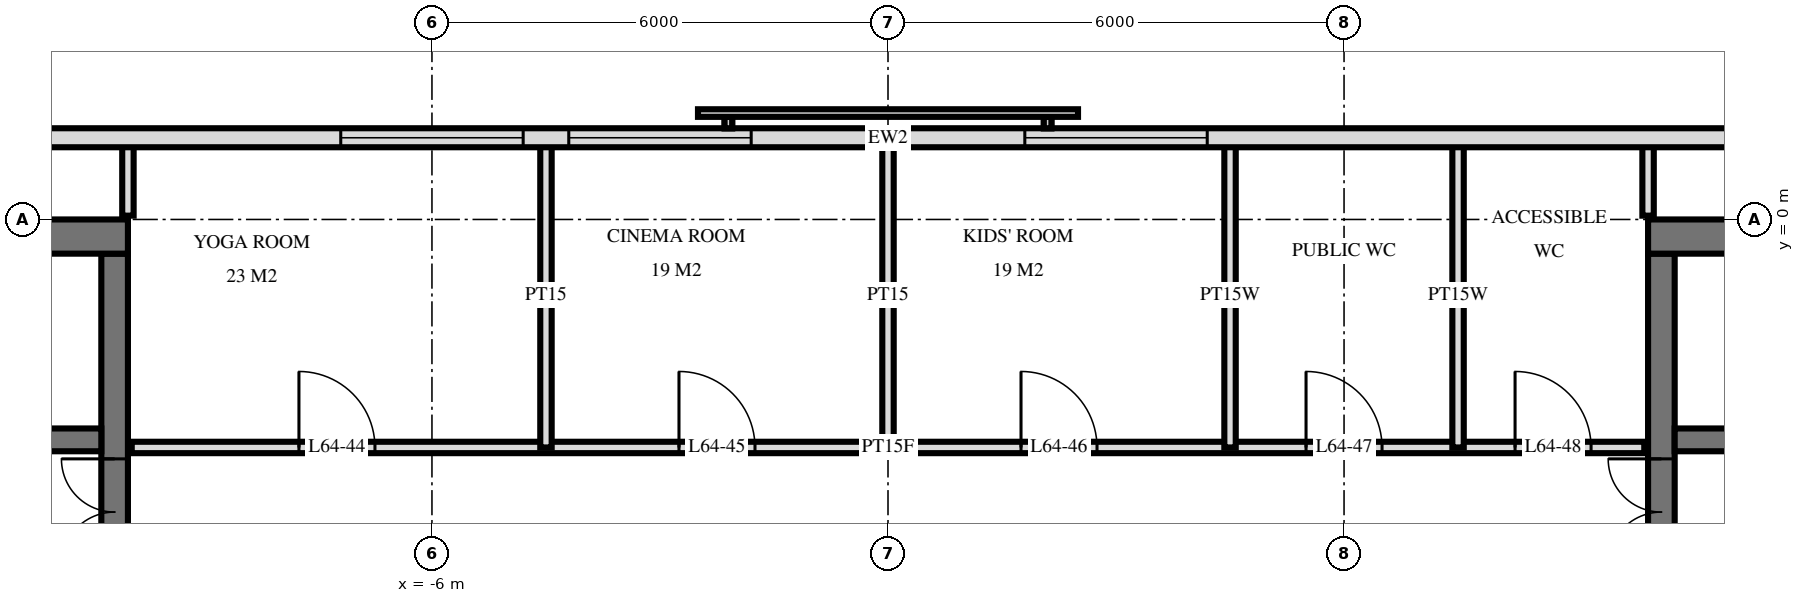
"""IFC4 building model, lengths in metres.
Left out: names, types, materials, properties, quantities, classifications, styles, units other than length and angle.
Written with IfcOpenShell. Run it as: python <this file> out.ifc"""

import sys

from ifc_helpers import new_model, si_unit, direction, frame, frame_2d, origin, place, context, subcontext, project, spatial, rectangle, extrude, element, fill, save


model = new_model("IFC4")
c1 = context("Model", 3, precision=1e-05, world=origin(), true_north=direction((0.0, 1.0)))
c2 = subcontext(c1, "Body", "Model", "MODEL_VIEW")
j1 = project(units=[si_unit("LENGTHUNIT", "METRE"), si_unit("PLANEANGLEUNIT", "RADIAN")], contexts=[c1])
p1 = place(None, origin())
s1 = spatial("IfcSite", under=j1, at=p1, CompositionType="ELEMENT")
p2 = place(p1, origin())
s2 = spatial("IfcBuilding", under=s1, at=p2, CompositionType="ELEMENT")
p3 = place(p2, frame((0.0, 0.0, 243.1)))
s3 = spatial("IfcBuildingStorey", under=s2, at=p3, CompositionType="ELEMENT", Elevation=243.1)
p4 = place(p3, frame((-24.5, -0.225, 0.0), z_axis=(0.0, 0.0, 1.0), x_axis=(1.0, 0.0, 0.0)))
e1 = element("IfcWall", 1, at=p4, inside=s3, PredefinedType="SHEAR", context=c2, shape_type="SweptSolid", body=[
    extrude(rectangle(XDim=14.5, YDim=0.45, at=frame_2d((7.25, 0.0))), origin(), (0.0, 0.0, 1.0), 3.5),
])
p5 = place(p3, frame((-10.175, -14.55, 0.0), z_axis=(0.0, 0.0, 1.0), x_axis=(0.0, 1.0, 0.0)))
e2 = element("IfcWall", 2, at=p5, inside=s3, PredefinedType="SHEAR", context=c2, shape_type="SweptSolid", body=[
    extrude(rectangle(XDim=14.1, YDim=0.35, at=frame_2d((7.05, 0.0))), origin(), (0.0, 0.0, 1.0), 3.5),
])
p6 = place(p5, frame((8.4, 0.0, 0.0)))
e3 = element("IfcOpeningElement", 3, at=p6, cuts=e2, PredefinedType="OPENING", context=c2, shape_type="SweptSolid", body=[
    extrude(rectangle(XDim=1.4, YDim=2.4, at=frame_2d((0.7, 1.2))), frame((0.0, 0.185, 0.0), z_axis=(0.0, -1.0, 0.0), x_axis=(1.0, 0.0, 0.0)), (0.0, 0.0, 1.0), 0.37),
])
p7 = place(p5, frame((10.0, 0.0, 0.0)))
e4 = element("IfcOpeningElement", 4, at=p7, cuts=e2, PredefinedType="OPENING", context=c2, shape_type="SweptSolid", body=[
    extrude(rectangle(XDim=1.4, YDim=2.4, at=frame_2d((0.7, 1.2))), frame((0.0, 0.185, 0.0), z_axis=(0.0, -1.0, 0.0), x_axis=(1.0, 0.0, 0.0)), (0.0, 0.0, 1.0), 0.37),
])
p8 = place(p5, frame((4.0, 0.0, 0.0)))
e5 = element("IfcOpeningElement", 5, at=p8, cuts=e2, PredefinedType="OPENING", context=c2, shape_type="SweptSolid", body=[
    extrude(rectangle(XDim=1.2, YDim=2.1, at=frame_2d((0.6, 1.05))), frame((0.0, 0.185, 0.0), z_axis=(0.0, -1.0, 0.0), x_axis=(1.0, 0.0, 0.0)), (0.0, 0.0, 1.0), 0.37),
])
p9 = place(p3, frame((-24.05, -2.9, 0.0), z_axis=(0.0, 0.0, 1.0), x_axis=(1.0, 0.0, 0.0)))
e6 = element("IfcWall", 6, at=p9, inside=s3, PredefinedType="SHEAR", context=c2, shape_type="SweptSolid", body=[
    extrude(rectangle(XDim=13.7, YDim=0.3, at=frame_2d((6.85, 0.0))), origin(), (0.0, 0.0, 1.0), 3.5),
])
p10 = place(p9, frame((0.55, 0.0, 0.0)))
e7 = element("IfcOpeningElement", 7, at=p10, cuts=e6, PredefinedType="OPENING", context=c2, shape_type="SweptSolid", body=[
    extrude(rectangle(XDim=1.1, YDim=2.1, at=frame_2d((0.55, 1.05))), frame((0.0, 0.16, 0.0), z_axis=(0.0, -1.0, 0.0), x_axis=(1.0, 0.0, 0.0)), (0.0, 0.0, 1.0), 0.32),
])
p11 = place(p9, frame((6.613, 0.0, 0.0)))
e8 = element("IfcOpeningElement", 8, at=p11, cuts=e6, PredefinedType="OPENING", context=c2, shape_type="SweptSolid", body=[
    extrude(rectangle(XDim=0.9, YDim=2.1, at=frame_2d((0.45, 1.05))), frame((0.0, 0.16, 0.0), z_axis=(0.0, -1.0, 0.0), x_axis=(1.0, 0.0, 0.0)), (0.0, 0.0, 1.0), 0.32),
])
p12 = place(p9, frame((5.188, 0.0, 0.0)))
e9 = element("IfcOpeningElement", 9, at=p12, cuts=e6, PredefinedType="OPENING", context=c2, shape_type="SweptSolid", body=[
    extrude(rectangle(XDim=0.9, YDim=2.1, at=frame_2d((0.45, 1.05))), frame((0.0, 0.16, 0.0), z_axis=(0.0, -1.0, 0.0), x_axis=(1.0, 0.0, 0.0)), (0.0, 0.0, 1.0), 0.32),
])
p13 = place(p9, frame((3.0, 0.0, 0.0)))
e10 = element("IfcOpeningElement", 10, at=p13, cuts=e6, PredefinedType="OPENING", context=c2, shape_type="SweptSolid", body=[
    extrude(rectangle(XDim=1.0, YDim=2.1, at=frame_2d((0.5, 1.05))), frame((0.0, 0.16, 0.0), z_axis=(0.0, -1.0, 0.0), x_axis=(1.0, 0.0, 0.0)), (0.0, 0.0, 1.0), 0.32),
])
p14 = place(p3, frame((10.0, -0.225, 0.0), z_axis=(0.0, 0.0, 1.0), x_axis=(1.0, 0.0, 0.0)))
e11 = element("IfcWall", 11, at=p14, inside=s3, PredefinedType="SHEAR", context=c2, shape_type="SweptSolid", body=[
    extrude(rectangle(XDim=14.5, YDim=0.45, at=frame_2d((7.25, 0.0))), origin(), (0.0, 0.0, 1.0), 3.5),
])
p15 = place(p3, frame((10.175, -14.55, 0.0), z_axis=(0.0, 0.0, 1.0), x_axis=(0.0, 1.0, 0.0)))
e12 = element("IfcWall", 12, at=p15, inside=s3, PredefinedType="SHEAR", context=c2, shape_type="SweptSolid", body=[
    extrude(rectangle(XDim=14.1, YDim=0.35, at=frame_2d((7.05, 0.0))), origin(), (0.0, 0.0, 1.0), 3.5),
])
p16 = place(p15, frame((8.4, 0.0, 0.0)))
e13 = element("IfcOpeningElement", 13, at=p16, cuts=e12, PredefinedType="OPENING", context=c2, shape_type="SweptSolid", body=[
    extrude(rectangle(XDim=1.4, YDim=2.4, at=frame_2d((0.7, 1.2))), frame((0.0, 0.185, 0.0), z_axis=(0.0, -1.0, 0.0), x_axis=(1.0, 0.0, 0.0)), (0.0, 0.0, 1.0), 0.37),
])
p17 = place(p15, frame((10.0, 0.0, 0.0)))
e14 = element("IfcOpeningElement", 14, at=p17, cuts=e12, PredefinedType="OPENING", context=c2, shape_type="SweptSolid", body=[
    extrude(rectangle(XDim=1.4, YDim=2.4, at=frame_2d((0.7, 1.2))), frame((0.0, 0.185, 0.0), z_axis=(0.0, -1.0, 0.0), x_axis=(1.0, 0.0, 0.0)), (0.0, 0.0, 1.0), 0.37),
])
p18 = place(p15, frame((4.0, 0.0, 0.0)))
e15 = element("IfcOpeningElement", 15, at=p18, cuts=e12, PredefinedType="OPENING", context=c2, shape_type="SweptSolid", body=[
    extrude(rectangle(XDim=1.2, YDim=2.1, at=frame_2d((0.6, 1.05))), frame((0.0, 0.185, 0.0), z_axis=(0.0, -1.0, 0.0), x_axis=(1.0, 0.0, 0.0)), (0.0, 0.0, 1.0), 0.37),
])
p19 = place(p3, frame((10.35, -2.9, 0.0), z_axis=(0.0, 0.0, 1.0), x_axis=(1.0, 0.0, 0.0)))
e16 = element("IfcWall", 16, at=p19, inside=s3, PredefinedType="SHEAR", context=c2, shape_type="SweptSolid", body=[
    extrude(rectangle(XDim=13.7, YDim=0.3, at=frame_2d((6.85, 0.0))), origin(), (0.0, 0.0, 1.0), 3.5),
])
p20 = place(p19, frame((12.05, 0.0, 0.0)))
e17 = element("IfcOpeningElement", 17, at=p20, cuts=e16, PredefinedType="OPENING", context=c2, shape_type="SweptSolid", body=[
    extrude(rectangle(XDim=1.1, YDim=2.1, at=frame_2d((0.55, 1.05))), frame((0.0, 0.16, 0.0), z_axis=(0.0, -1.0, 0.0), x_axis=(1.0, 0.0, 0.0)), (0.0, 0.0, 1.0), 0.32),
])
p21 = place(p19, frame((6.188, 0.0, 0.0)))
e18 = element("IfcOpeningElement", 18, at=p21, cuts=e16, PredefinedType="OPENING", context=c2, shape_type="SweptSolid", body=[
    extrude(rectangle(XDim=0.9, YDim=2.1, at=frame_2d((0.45, 1.05))), frame((0.0, 0.16, 0.0), z_axis=(0.0, -1.0, 0.0), x_axis=(1.0, 0.0, 0.0)), (0.0, 0.0, 1.0), 0.32),
])
p22 = place(p19, frame((7.613, 0.0, 0.0)))
e19 = element("IfcOpeningElement", 19, at=p22, cuts=e16, PredefinedType="OPENING", context=c2, shape_type="SweptSolid", body=[
    extrude(rectangle(XDim=0.9, YDim=2.1, at=frame_2d((0.45, 1.05))), frame((0.0, 0.16, 0.0), z_axis=(0.0, -1.0, 0.0), x_axis=(1.0, 0.0, 0.0)), (0.0, 0.0, 1.0), 0.32),
])
p23 = place(p19, frame((9.7, 0.0, 0.0)))
e20 = element("IfcOpeningElement", 20, at=p23, cuts=e16, PredefinedType="OPENING", context=c2, shape_type="SweptSolid", body=[
    extrude(rectangle(XDim=1.0, YDim=2.1, at=frame_2d((0.5, 1.05))), frame((0.0, 0.16, 0.0), z_axis=(0.0, -1.0, 0.0), x_axis=(1.0, 0.0, 0.0)), (0.0, 0.0, 1.0), 0.32),
])
p24 = place(p3, frame((22.475, 1.075, 0.0), z_axis=(0.0, 0.0, 1.0), x_axis=(-1.0, 0.0, 0.0)))
e21 = element("IfcWall", 21, at=p24, inside=s3, PredefinedType="SOLIDWALL", context=c2, shape_type="SweptSolid", body=[
    extrude(rectangle(XDim=44.951, YDim=0.25, at=frame_2d((22.475, 0.0))), origin(), (0.0, 0.0, 1.0), 3.2),
])
p25 = place(p24, frame((18.275, 0.0, 0.9)))
e22 = element("IfcOpeningElement", 22, at=p25, cuts=e21, PredefinedType="OPENING", context=c2, shape_type="SweptSolid", body=[
    extrude(rectangle(XDim=2.4, YDim=1.5, at=frame_2d((1.2, 0.75))), frame((0.0, 0.135, 0.0), z_axis=(0.0, -1.0, 0.0), x_axis=(1.0, 0.0, 0.0)), (0.0, 0.0, 1.0), 0.27),
])
p26 = place(p24, frame((24.275, 0.0, 0.9)))
e23 = element("IfcOpeningElement", 23, at=p26, cuts=e21, PredefinedType="OPENING", context=c2, shape_type="SweptSolid", body=[
    extrude(rectangle(XDim=2.4, YDim=1.5, at=frame_2d((1.2, 0.75))), frame((0.0, 0.135, 0.0), z_axis=(0.0, -1.0, 0.0), x_axis=(1.0, 0.0, 0.0)), (0.0, 0.0, 1.0), 0.27),
])
p27 = place(p24, frame((27.275, 0.0, 0.9)))
e24 = element("IfcOpeningElement", 24, at=p27, cuts=e21, PredefinedType="OPENING", context=c2, shape_type="SweptSolid", body=[
    extrude(rectangle(XDim=2.4, YDim=1.5, at=frame_2d((1.2, 0.75))), frame((0.0, 0.135, 0.0), z_axis=(0.0, -1.0, 0.0), x_axis=(1.0, 0.0, 0.0)), (0.0, 0.0, 1.0), 0.27),
])
p28 = place(p3, frame((10.0, 0.05, 0.0), z_axis=(0.0, 0.0, 1.0), x_axis=(0.0, 1.0, 0.0)))
e25 = element("IfcWall", 25, at=p28, inside=s3, PredefinedType="PLUMBINGWALL", context=c2, shape_type="SweptSolid", body=[
    extrude(rectangle(XDim=0.97, YDim=0.15, at=frame_2d((0.485, 0.0))), origin(), (0.0, 0.0, 1.0), 3.22),
])
for number, where, z_axis, x_axis in (
    (26, (7.5, -3.0, 0.0), (0.0, 0.0, 1.0), (0.0, 1.0, 0.0)),
    (27, (4.5, -3.0, 0.0), (0.0, 0.0, 1.0), (0.0, 1.0, 0.0)),
):
    element("IfcWall", number, at=place(p3, frame(where, z_axis=z_axis, x_axis=x_axis)), inside=s3, PredefinedType="PLUMBINGWALL", context=c2, shape_type="SweptSolid", body=[
        extrude(rectangle(XDim=4.02, YDim=0.15, at=frame_2d((2.01, 0.0))), origin(), (0.0, 0.0, 1.0), 3.22),
    ])
for number, where, z_axis, x_axis in (
    (28, (0.0, -3.0, 0.0), (0.0, 0.0, 1.0), (0.0, 1.0, 0.0)),
    (29, (-4.5, -3.0, 0.0), (0.0, 0.0, 1.0), (0.0, 1.0, 0.0)),
):
    element("IfcWall", number, at=place(p3, frame(where, z_axis=z_axis, x_axis=x_axis)), inside=s3, PredefinedType="PARTITIONING", context=c2, shape_type="SweptSolid", body=[
        extrude(rectangle(XDim=4.02, YDim=0.15, at=frame_2d((2.01, 0.0))), origin(), (0.0, 0.0, 1.0), 3.22),
    ])
p29 = place(p3, frame((-10.0, 0.05, 0.0), z_axis=(0.0, 0.0, 1.0), x_axis=(0.0, 1.0, 0.0)))
e30 = element("IfcWall", 30, at=p29, inside=s3, PredefinedType="PARTITIONING", context=c2, shape_type="SweptSolid", body=[
    extrude(rectangle(XDim=0.97, YDim=0.15, at=frame_2d((0.485, 0.0))), origin(), (0.0, 0.0, 1.0), 3.22),
])
p30 = place(p3, frame((-9.95, -3.0, 0.0), z_axis=(0.0, 0.0, 1.0), x_axis=(1.0, 0.0, 0.0)))
e31 = element("IfcWall", 31, at=p30, inside=s3, PredefinedType="PARTITIONING", context=c2, shape_type="SweptSolid", body=[
    extrude(rectangle(XDim=19.9, YDim=0.15, at=frame_2d((9.95, 0.0))), origin(), (0.0, 0.0, 1.0), 3.22),
])
p31 = place(p30, frame((2.2, 0.0, 0.0)))
e32 = element("IfcOpeningElement", 32, at=p31, cuts=e31, PredefinedType="OPENING", context=c2, shape_type="SweptSolid", body=[
    extrude(rectangle(XDim=1.0, YDim=2.1, at=frame_2d((0.5, 1.05))), frame((0.0, 0.085, 0.0), z_axis=(0.0, -1.0, 0.0), x_axis=(1.0, 0.0, 0.0)), (0.0, 0.0, 1.0), 0.17),
])
p32 = place(p30, frame((7.2, 0.0, 0.0)))
e33 = element("IfcOpeningElement", 33, at=p32, cuts=e31, PredefinedType="OPENING", context=c2, shape_type="SweptSolid", body=[
    extrude(rectangle(XDim=1.0, YDim=2.1, at=frame_2d((0.5, 1.05))), frame((0.0, 0.085, 0.0), z_axis=(0.0, -1.0, 0.0), x_axis=(1.0, 0.0, 0.0)), (0.0, 0.0, 1.0), 0.17),
])
p33 = place(p30, frame((11.7, 0.0, 0.0)))
e34 = element("IfcOpeningElement", 34, at=p33, cuts=e31, PredefinedType="OPENING", context=c2, shape_type="SweptSolid", body=[
    extrude(rectangle(XDim=1.0, YDim=2.1, at=frame_2d((0.5, 1.05))), frame((0.0, 0.085, 0.0), z_axis=(0.0, -1.0, 0.0), x_axis=(1.0, 0.0, 0.0)), (0.0, 0.0, 1.0), 0.17),
])
p34 = place(p30, frame((15.45, 0.0, 0.0)))
e35 = element("IfcOpeningElement", 35, at=p34, cuts=e31, PredefinedType="OPENING", context=c2, shape_type="SweptSolid", body=[
    extrude(rectangle(XDim=1.0, YDim=2.1, at=frame_2d((0.5, 1.05))), frame((0.0, 0.085, 0.0), z_axis=(0.0, -1.0, 0.0), x_axis=(1.0, 0.0, 0.0)), (0.0, 0.0, 1.0), 0.17),
])
p35 = place(p30, frame((18.2, 0.0, 0.0)))
e36 = element("IfcOpeningElement", 36, at=p35, cuts=e31, PredefinedType="OPENING", context=c2, shape_type="SweptSolid", body=[
    extrude(rectangle(XDim=1.0, YDim=2.1, at=frame_2d((0.5, 1.05))), frame((0.0, 0.085, 0.0), z_axis=(0.0, -1.0, 0.0), x_axis=(1.0, 0.0, 0.0)), (0.0, 0.0, 1.0), 0.17),
])
p36 = place(p25, origin())
e37 = element("IfcWindow", 37, at=p36, inside=s3, PartitioningType="SINGLE_PANEL", PredefinedType="WINDOW", context=c2, shape_type="SweptSolid", body=[
    extrude(rectangle(XDim=2.4, YDim=1.5, at=frame_2d((1.2, 0.75))), frame((0.0, 0.03, 0.0), z_axis=(0.0, -1.0, 0.0), x_axis=(1.0, 0.0, 0.0)), (0.0, 0.0, 1.0), 0.06),
])
fill(e22, e37)
p37 = place(p26, origin())
e38 = element("IfcWindow", 38, at=p37, inside=s3, PartitioningType="SINGLE_PANEL", PredefinedType="WINDOW", context=c2, shape_type="SweptSolid", body=[
    extrude(rectangle(XDim=2.4, YDim=1.5, at=frame_2d((1.2, 0.75))), frame((0.0, 0.03, 0.0), z_axis=(0.0, -1.0, 0.0), x_axis=(1.0, 0.0, 0.0)), (0.0, 0.0, 1.0), 0.06),
])
fill(e23, e38)
p38 = place(p27, origin())
e39 = element("IfcWindow", 39, at=p38, inside=s3, PartitioningType="SINGLE_PANEL", PredefinedType="WINDOW", context=c2, shape_type="SweptSolid", body=[
    extrude(rectangle(XDim=2.4, YDim=1.5, at=frame_2d((1.2, 0.75))), frame((0.0, 0.03, 0.0), z_axis=(0.0, -1.0, 0.0), x_axis=(1.0, 0.0, 0.0)), (0.0, 0.0, 1.0), 0.06),
])
fill(e24, e39)
p39 = place(p7, origin())
e40 = element("IfcDoor", 40, at=p39, inside=s3, OperationType="DOUBLE_DOOR_SINGLE_SWING", PredefinedType="DOOR", context=c2, shape_type="SweptSolid", body=[
    extrude(rectangle(XDim=1.4, YDim=2.4, at=frame_2d((0.7, 1.2))), frame((0.0, 0.025, 0.0), z_axis=(0.0, -1.0, 0.0), x_axis=(1.0, 0.0, 0.0)), (0.0, 0.0, 1.0), 0.05),
])
fill(e4, e40)
p40 = place(p17, origin())
e41 = element("IfcDoor", 41, at=p40, inside=s3, OperationType="DOUBLE_DOOR_SINGLE_SWING", PredefinedType="DOOR", context=c2, shape_type="SweptSolid", body=[
    extrude(rectangle(XDim=1.4, YDim=2.4, at=frame_2d((0.7, 1.2))), frame((0.0, 0.025, 0.0), z_axis=(0.0, -1.0, 0.0), x_axis=(1.0, 0.0, 0.0)), (0.0, 0.0, 1.0), 0.05),
])
fill(e14, e41)
p41 = place(p31, origin())
e42 = element("IfcDoor", 42, at=p41, inside=s3, OperationType="SINGLE_SWING_RIGHT", PredefinedType="DOOR", context=c2, shape_type="SweptSolid", body=[
    extrude(rectangle(XDim=1.0, YDim=2.1, at=frame_2d((0.5, 1.05))), frame((0.0, 0.025, 0.0), z_axis=(0.0, -1.0, 0.0), x_axis=(1.0, 0.0, 0.0)), (0.0, 0.0, 1.0), 0.05),
])
fill(e32, e42)
p42 = place(p32, origin())
e43 = element("IfcDoor", 43, at=p42, inside=s3, OperationType="SINGLE_SWING_RIGHT", PredefinedType="DOOR", context=c2, shape_type="SweptSolid", body=[
    extrude(rectangle(XDim=1.0, YDim=2.1, at=frame_2d((0.5, 1.05))), frame((0.0, 0.025, 0.0), z_axis=(0.0, -1.0, 0.0), x_axis=(1.0, 0.0, 0.0)), (0.0, 0.0, 1.0), 0.05),
])
fill(e33, e43)
p43 = place(p33, origin())
e44 = element("IfcDoor", 44, at=p43, inside=s3, OperationType="SINGLE_SWING_RIGHT", PredefinedType="DOOR", context=c2, shape_type="SweptSolid", body=[
    extrude(rectangle(XDim=1.0, YDim=2.1, at=frame_2d((0.5, 1.05))), frame((0.0, 0.025, 0.0), z_axis=(0.0, -1.0, 0.0), x_axis=(1.0, 0.0, 0.0)), (0.0, 0.0, 1.0), 0.05),
])
fill(e34, e44)
p44 = place(p34, origin())
e45 = element("IfcDoor", 45, at=p44, inside=s3, OperationType="SINGLE_SWING_RIGHT", PredefinedType="DOOR", context=c2, shape_type="SweptSolid", body=[
    extrude(rectangle(XDim=1.0, YDim=2.1, at=frame_2d((0.5, 1.05))), frame((0.0, 0.025, 0.0), z_axis=(0.0, -1.0, 0.0), x_axis=(1.0, 0.0, 0.0)), (0.0, 0.0, 1.0), 0.05),
])
fill(e35, e45)
p45 = place(p35, origin())
e46 = element("IfcDoor", 46, at=p45, inside=s3, OperationType="SINGLE_SWING_RIGHT", PredefinedType="DOOR", context=c2, shape_type="SweptSolid", body=[
    extrude(rectangle(XDim=1.0, YDim=2.1, at=frame_2d((0.5, 1.05))), frame((0.0, 0.025, 0.0), z_axis=(0.0, -1.0, 0.0), x_axis=(1.0, 0.0, 0.0)), (0.0, 0.0, 1.0), 0.05),
])
fill(e36, e46)
save(model, sys.argv[1])
